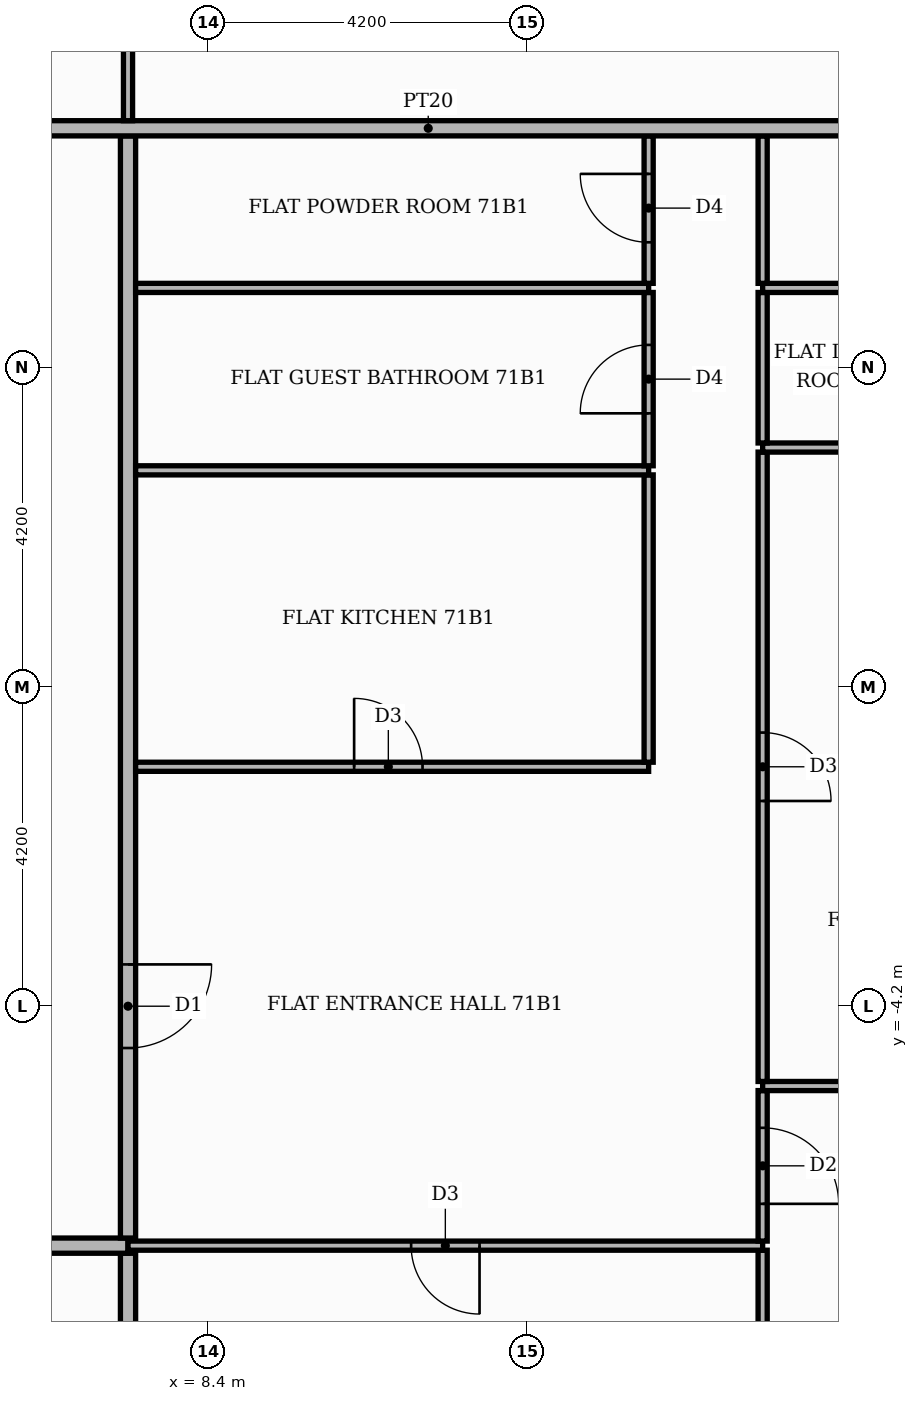
"""IFC4 building model, lengths in metres.
Left out: names, types, materials, properties, quantities, classifications, styles, units other than length and angle.
Written with IfcOpenShell. Run it as: python <this file> out.ifc"""

import sys

from ifc_helpers import new_model, si_unit, direction, frame, frame_2d, origin, place, context, subcontext, project, spatial, rectangle, extrude, element, fill, save


model = new_model("IFC4")
c1 = context("Model", 3, precision=1e-05, world=origin(), true_north=direction((0.0, 1.0)))
c2 = subcontext(c1, "Body", "Model", "MODEL_VIEW")
j1 = project(units=[si_unit("LENGTHUNIT", "METRE"), si_unit("PLANEANGLEUNIT", "RADIAN")], contexts=[c1])
p1 = place(None, origin())
s1 = spatial("IfcSite", under=j1, at=p1, CompositionType="ELEMENT")
p2 = place(p1, origin())
s2 = spatial("IfcBuilding", under=s1, at=p2, CompositionType="ELEMENT")
p3 = place(p2, frame((0.0, 0.0, 296.7)))
s3 = spatial("IfcBuildingStorey", under=s2, at=p3, CompositionType="ELEMENT", Elevation=296.7)
p4 = place(p3, frame((7.35, -21.3, 0.0), z_axis=(0.0, 0.0, 1.0), x_axis=(0.0, 1.0, 0.0)))
e1 = element("IfcWall", 1, at=p4, inside=s3, PredefinedType="PARTITIONING", context=c2, shape_type="SweptSolid", body=[
    extrude(rectangle(XDim=13.85, YDim=0.2, at=frame_2d((6.925, 0.0))), origin(), (0.0, 0.0, 1.0), 3.55),
])
p5 = place(p3, frame((15.7, -14.9, 0.0), z_axis=(0.0, 0.0, 1.0), x_axis=(0.0, 1.0, 0.0)))
e2 = element("IfcWall", 2, at=p5, inside=s3, PredefinedType="PARTITIONING", context=c2, shape_type="SweptSolid", body=[
    extrude(rectangle(XDim=7.49, YDim=0.12, at=frame_2d((3.745, 0.0))), origin(), (0.0, 0.0, 1.0), 3.55),
])
p6 = place(p3, frame((-21.3, -7.35, 0.0), z_axis=(0.0, 0.0, 1.0), x_axis=(1.0, 0.0, 0.0)))
e3 = element("IfcWall", 3, at=p6, inside=s3, PredefinedType="PARTITIONING", context=c2, shape_type="SweptSolid", body=[
    extrude(rectangle(XDim=28.65, YDim=0.2, at=frame_2d((14.325, 0.0))), origin(), (0.0, 0.0, 1.0), 3.55),
])
p7 = place(p6, frame((16.55, 0.0, 0.0)))
e4 = element("IfcOpeningElement", 4, at=p7, cuts=e3, PredefinedType="OPENING", context=c2, shape_type="SweptSolid", body=[
    extrude(rectangle(XDim=1.1, YDim=2.4, at=frame_2d((0.55, 1.2))), frame((0.0, 0.11, 0.0), z_axis=(0.0, -1.0, 0.0), x_axis=(1.0, 0.0, 0.0)), (0.0, 0.0, 1.0), 0.22),
])
p8 = place(p3, frame((7.35, -7.35, 0.0), z_axis=(0.0, 0.0, 1.0), x_axis=(1.0, 0.0, 0.0)))
e5 = element("IfcWall", 5, at=p8, inside=s3, PredefinedType="PARTITIONING", context=c2, shape_type="SweptSolid", body=[
    extrude(rectangle(XDim=8.35, YDim=0.12, at=frame_2d((4.175, 0.0))), origin(), (0.0, 0.0, 1.0), 3.55),
])
p9 = place(p8, frame((3.725, 0.0, 0.0)))
e6 = element("IfcOpeningElement", 6, at=p9, cuts=e5, PredefinedType="OPENING", context=c2, shape_type="SweptSolid", body=[
    extrude(rectangle(XDim=0.9, YDim=2.1, at=frame_2d((0.45, 1.05))), frame((0.0, 0.07, 0.0), z_axis=(0.0, -1.0, 0.0), x_axis=(1.0, 0.0, 0.0)), (0.0, 0.0, 1.0), 0.14),
])
p10 = place(p3, frame((15.7, -7.29, 0.0), z_axis=(0.0, 0.0, 1.0), x_axis=(0.0, 1.0, 0.0)))
e7 = element("IfcWall", 7, at=p10, inside=s3, PredefinedType="PARTITIONING", context=c2, shape_type="SweptSolid", body=[
    extrude(rectangle(XDim=1.98, YDim=0.12, at=frame_2d((0.99, 0.0))), origin(), (0.0, 0.0, 1.0), 3.55),
])
p11 = place(p10, frame((0.49, 0.0, 0.0)))
e8 = element("IfcOpeningElement", 8, at=p11, cuts=e7, PredefinedType="OPENING", context=c2, shape_type="SweptSolid", body=[
    extrude(rectangle(XDim=1.0, YDim=2.1, at=frame_2d((0.5, 1.05))), frame((0.0, 0.07, 0.0), z_axis=(0.0, -1.0, 0.0), x_axis=(1.0, 0.0, 0.0)), (0.0, 0.0, 1.0), 0.14),
])
p12 = place(p3, frame((7.35, -7.25, 0.0), z_axis=(0.0, 0.0, 1.0), x_axis=(0.0, 1.0, 0.0)))
e9 = element("IfcWall", 9, at=p12, inside=s3, PredefinedType="PARTITIONING", context=c2, shape_type="SweptSolid", body=[
    extrude(rectangle(XDim=14.5, YDim=0.2, at=frame_2d((7.25, 0.0))), origin(), (0.0, 0.0, 1.0), 3.55),
])
p13 = place(p12, frame((2.5, 0.0, 0.0)))
e10 = element("IfcOpeningElement", 10, at=p13, cuts=e9, PredefinedType="OPENING", context=c2, shape_type="SweptSolid", body=[
    extrude(rectangle(XDim=1.1, YDim=2.4, at=frame_2d((0.55, 1.2))), frame((0.0, 0.11, 0.0), z_axis=(0.0, -1.0, 0.0), x_axis=(1.0, 0.0, 0.0)), (0.0, 0.0, 1.0), 0.22),
])
p14 = place(p3, frame((15.7, -5.25, 0.0), z_axis=(0.0, 0.0, 1.0), x_axis=(1.0, 0.0, 0.0)))
e11 = element("IfcWall", 11, at=p14, inside=s3, PredefinedType="PARTITIONING", context=c2, shape_type="SweptSolid", body=[
    extrude(rectangle(XDim=5.6, YDim=0.12, at=frame_2d((2.8, 0.0))), origin(), (0.0, 0.0, 1.0), 3.55),
])
p15 = place(p3, frame((15.7, -5.19, 0.0), z_axis=(0.0, 0.0, 1.0), x_axis=(0.0, 1.0, 0.0)))
e12 = element("IfcWall", 12, at=p15, inside=s3, PredefinedType="PARTITIONING", context=c2, shape_type="SweptSolid", body=[
    extrude(rectangle(XDim=8.28, YDim=0.12, at=frame_2d((4.14, 0.0))), origin(), (0.0, 0.0, 1.0), 3.55),
])
p16 = place(p15, frame((3.69, 0.0, 0.0)))
e13 = element("IfcOpeningElement", 13, at=p16, cuts=e12, PredefinedType="OPENING", context=c2, shape_type="SweptSolid", body=[
    extrude(rectangle(XDim=0.9, YDim=2.1, at=frame_2d((0.45, 1.05))), frame((0.0, 0.07, 0.0), z_axis=(0.0, -1.0, 0.0), x_axis=(1.0, 0.0, 0.0)), (0.0, 0.0, 1.0), 0.14),
])
p17 = place(p3, frame((7.45, -1.05, 0.0), z_axis=(0.0, 0.0, 1.0), x_axis=(1.0, 0.0, 0.0)))
e14 = element("IfcWall", 14, at=p17, inside=s3, PredefinedType="PARTITIONING", context=c2, shape_type="SweptSolid", body=[
    extrude(rectangle(XDim=6.75, YDim=0.12, at=frame_2d((3.375, 0.0))), origin(), (0.0, 0.0, 1.0), 3.55),
])
p18 = place(p17, frame((2.875, 0.0, 0.0)))
e15 = element("IfcOpeningElement", 15, at=p18, cuts=e14, PredefinedType="OPENING", context=c2, shape_type="SweptSolid", body=[
    extrude(rectangle(XDim=0.9, YDim=2.1, at=frame_2d((0.45, 1.05))), frame((0.0, 0.07, 0.0), z_axis=(0.0, -1.0, 0.0), x_axis=(1.0, 0.0, 0.0)), (0.0, 0.0, 1.0), 0.14),
])
p19 = place(p3, frame((14.2, -0.99, 0.0), z_axis=(0.0, 0.0, 1.0), x_axis=(0.0, 1.0, 0.0)))
e16 = element("IfcWall", 16, at=p19, inside=s3, PredefinedType="PARTITIONING", context=c2, shape_type="SweptSolid", body=[
    extrude(rectangle(XDim=3.78, YDim=0.12, at=frame_2d((1.89, 0.0))), origin(), (0.0, 0.0, 1.0), 3.55),
])
p20 = place(p3, frame((7.45, 2.85, 0.0), z_axis=(0.0, 0.0, 1.0), x_axis=(1.0, 0.0, 0.0)))
e17 = element("IfcWall", 17, at=p20, inside=s3, PredefinedType="PARTITIONING", context=c2, shape_type="SweptSolid", body=[
    extrude(rectangle(XDim=6.75, YDim=0.12, at=frame_2d((3.375, 0.0))), origin(), (0.0, 0.0, 1.0), 3.55),
])
p21 = place(p3, frame((14.2, 2.91, 0.0), z_axis=(0.0, 0.0, 1.0), x_axis=(0.0, 1.0, 0.0)))
e18 = element("IfcWall", 18, at=p21, inside=s3, PredefinedType="PARTITIONING", context=c2, shape_type="SweptSolid", body=[
    extrude(rectangle(XDim=2.28, YDim=0.12, at=frame_2d((1.14, 0.0))), origin(), (0.0, 0.0, 1.0), 3.55),
])
p22 = place(p21, frame((0.69, 0.0, 0.0)))
e19 = element("IfcOpeningElement", 19, at=p22, cuts=e18, PredefinedType="OPENING", context=c2, shape_type="SweptSolid", body=[
    extrude(rectangle(XDim=0.9, YDim=2.1, at=frame_2d((0.45, 1.05))), frame((0.0, 0.07, 0.0), z_axis=(0.0, -1.0, 0.0), x_axis=(1.0, 0.0, 0.0)), (0.0, 0.0, 1.0), 0.14),
])
p23 = place(p3, frame((15.7, 3.15, 0.0), z_axis=(0.0, 0.0, 1.0), x_axis=(1.0, 0.0, 0.0)))
e20 = element("IfcWall", 20, at=p23, inside=s3, PredefinedType="PARTITIONING", context=c2, shape_type="SweptSolid", body=[
    extrude(rectangle(XDim=5.6, YDim=0.12, at=frame_2d((2.8, 0.0))), origin(), (0.0, 0.0, 1.0), 3.55),
])
p24 = place(p23, frame((2.5, 0.0, 0.0)))
e21 = element("IfcOpeningElement", 21, at=p24, cuts=e20, PredefinedType="OPENING", context=c2, shape_type="SweptSolid", body=[
    extrude(rectangle(XDim=0.9, YDim=2.1, at=frame_2d((0.45, 1.05))), frame((0.0, 0.07, 0.0), z_axis=(0.0, -1.0, 0.0), x_axis=(1.0, 0.0, 0.0)), (0.0, 0.0, 1.0), 0.14),
])
p25 = place(p3, frame((15.7, 3.21, 0.0), z_axis=(0.0, 0.0, 1.0), x_axis=(0.0, 1.0, 0.0)))
e22 = element("IfcWall", 22, at=p25, inside=s3, PredefinedType="PARTITIONING", context=c2, shape_type="SweptSolid", body=[
    extrude(rectangle(XDim=1.98, YDim=0.12, at=frame_2d((0.99, 0.0))), origin(), (0.0, 0.0, 1.0), 3.55),
])
p26 = place(p3, frame((7.45, 5.25, 0.0), z_axis=(0.0, 0.0, 1.0), x_axis=(1.0, 0.0, 0.0)))
e23 = element("IfcWall", 23, at=p26, inside=s3, PredefinedType="PARTITIONING", context=c2, shape_type="SweptSolid", body=[
    extrude(rectangle(XDim=6.75, YDim=0.12, at=frame_2d((3.375, 0.0))), origin(), (0.0, 0.0, 1.0), 3.55),
])
p27 = place(p3, frame((15.7, 5.25, 0.0), z_axis=(0.0, 0.0, 1.0), x_axis=(1.0, 0.0, 0.0)))
e24 = element("IfcWall", 24, at=p27, inside=s3, PredefinedType="PARTITIONING", context=c2, shape_type="SweptSolid", body=[
    extrude(rectangle(XDim=5.6, YDim=0.12, at=frame_2d((2.8, 0.0))), origin(), (0.0, 0.0, 1.0), 3.55),
])
p28 = place(p27, frame((2.5, 0.0, 0.0)))
e25 = element("IfcOpeningElement", 25, at=p28, cuts=e24, PredefinedType="OPENING", context=c2, shape_type="SweptSolid", body=[
    extrude(rectangle(XDim=0.9, YDim=2.1, at=frame_2d((0.45, 1.05))), frame((0.0, 0.07, 0.0), z_axis=(0.0, -1.0, 0.0), x_axis=(1.0, 0.0, 0.0)), (0.0, 0.0, 1.0), 0.14),
])
p29 = place(p3, frame((14.2, 5.31, 0.0), z_axis=(0.0, 0.0, 1.0), x_axis=(0.0, 1.0, 0.0)))
e26 = element("IfcWall", 26, at=p29, inside=s3, PredefinedType="PARTITIONING", context=c2, shape_type="SweptSolid", body=[
    extrude(rectangle(XDim=1.94, YDim=0.12, at=frame_2d((0.97, 0.0))), origin(), (0.0, 0.0, 1.0), 3.55),
])
p30 = place(p29, frame((0.54, 0.0, 0.0)))
e27 = element("IfcOpeningElement", 27, at=p30, cuts=e26, PredefinedType="OPENING", context=c2, shape_type="SweptSolid", body=[
    extrude(rectangle(XDim=0.9, YDim=2.1, at=frame_2d((0.45, 1.05))), frame((0.0, 0.07, 0.0), z_axis=(0.0, -1.0, 0.0), x_axis=(1.0, 0.0, 0.0)), (0.0, 0.0, 1.0), 0.14),
])
p31 = place(p3, frame((15.7, 5.31, 0.0), z_axis=(0.0, 0.0, 1.0), x_axis=(0.0, 1.0, 0.0)))
e28 = element("IfcWall", 28, at=p31, inside=s3, PredefinedType="PARTITIONING", context=c2, shape_type="SweptSolid", body=[
    extrude(rectangle(XDim=1.94, YDim=0.12, at=frame_2d((0.97, 0.0))), origin(), (0.0, 0.0, 1.0), 3.55),
])
p32 = place(p3, frame((1.3, 7.35, 0.0), z_axis=(0.0, 0.0, 1.0), x_axis=(1.0, 0.0, 0.0)))
e29 = element("IfcWall", 29, at=p32, inside=s3, PredefinedType="PARTITIONING", context=c2, shape_type="SweptSolid", body=[
    extrude(rectangle(XDim=20.0, YDim=0.2, at=frame_2d((10.0, 0.0))), origin(), (0.0, 0.0, 1.0), 3.55),
])
p33 = place(p32, frame((2.475, 0.0, 0.0)))
e30 = element("IfcOpeningElement", 30, at=p33, cuts=e29, PredefinedType="OPENING", context=c2, shape_type="SweptSolid", body=[
    extrude(rectangle(XDim=1.1, YDim=2.4, at=frame_2d((0.55, 1.2))), frame((0.0, 0.11, 0.0), z_axis=(0.0, -1.0, 0.0), x_axis=(1.0, 0.0, 0.0)), (0.0, 0.0, 1.0), 0.22),
])
p34 = place(p3, frame((7.35, 7.45, 0.0), z_axis=(0.0, 0.0, 1.0), x_axis=(0.0, 1.0, 0.0)))
e31 = element("IfcWall", 31, at=p34, inside=s3, PredefinedType="PARTITIONING", context=c2, shape_type="SweptSolid", body=[
    extrude(rectangle(XDim=8.49, YDim=0.12, at=frame_2d((4.245, 0.0))), origin(), (0.0, 0.0, 1.0), 3.55),
])
p35 = place(p34, frame((3.775, 0.0, 0.0)))
e32 = element("IfcOpeningElement", 32, at=p35, cuts=e31, PredefinedType="OPENING", context=c2, shape_type="SweptSolid", body=[
    extrude(rectangle(XDim=0.9, YDim=2.1, at=frame_2d((0.45, 1.05))), frame((0.0, 0.07, 0.0), z_axis=(0.0, -1.0, 0.0), x_axis=(1.0, 0.0, 0.0)), (0.0, 0.0, 1.0), 0.14),
])
p36 = place(p13, frame((1.1, 0.0, 0.0), z_axis=(0.0, 0.0, 1.0), x_axis=(-1.0, 0.0, 0.0)))
e33 = element("IfcDoor", 33, at=p36, inside=s3, OperationType="SINGLE_SWING_RIGHT", PredefinedType="DOOR", context=c2, shape_type="SweptSolid", body=[
    extrude(rectangle(XDim=1.1, YDim=2.4, at=frame_2d((0.55, 1.2))), frame((0.0, 0.025, 0.0), z_axis=(0.0, -1.0, 0.0), x_axis=(1.0, 0.0, 0.0)), (0.0, 0.0, 1.0), 0.05),
])
fill(e10, e33)
p37 = place(p9, frame((0.9, 0.0, 0.0), z_axis=(0.0, 0.0, 1.0), x_axis=(-1.0, 0.0, 0.0)))
e34 = element("IfcDoor", 34, at=p37, inside=s3, OperationType="SINGLE_SWING_RIGHT", PredefinedType="DOOR", context=c2, shape_type="SweptSolid", body=[
    extrude(rectangle(XDim=0.9, YDim=2.1, at=frame_2d((0.45, 1.05))), frame((0.0, 0.025, 0.0), z_axis=(0.0, -1.0, 0.0), x_axis=(1.0, 0.0, 0.0)), (0.0, 0.0, 1.0), 0.05),
])
fill(e6, e34)
p38 = place(p18, origin())
e35 = element("IfcDoor", 35, at=p38, inside=s3, OperationType="SINGLE_SWING_LEFT", PredefinedType="DOOR", context=c2, shape_type="SweptSolid", body=[
    extrude(rectangle(XDim=0.9, YDim=2.1, at=frame_2d((0.45, 1.05))), frame((0.0, 0.025, 0.0), z_axis=(0.0, -1.0, 0.0), x_axis=(1.0, 0.0, 0.0)), (0.0, 0.0, 1.0), 0.05),
])
fill(e15, e35)
p39 = place(p22, origin())
e36 = element("IfcDoor", 36, at=p39, inside=s3, OperationType="SINGLE_SWING_LEFT", PredefinedType="DOOR", context=c2, shape_type="SweptSolid", body=[
    extrude(rectangle(XDim=0.9, YDim=2.1, at=frame_2d((0.45, 1.05))), frame((0.0, 0.025, 0.0), z_axis=(0.0, -1.0, 0.0), x_axis=(1.0, 0.0, 0.0)), (0.0, 0.0, 1.0), 0.05),
])
fill(e19, e36)
p40 = place(p30, origin())
e37 = element("IfcDoor", 37, at=p40, inside=s3, OperationType="SINGLE_SWING_RIGHT", PredefinedType="DOOR", context=c2, shape_type="SweptSolid", body=[
    extrude(rectangle(XDim=0.9, YDim=2.1, at=frame_2d((0.45, 1.05))), frame((0.0, 0.025, 0.0), z_axis=(0.0, -1.0, 0.0), x_axis=(1.0, 0.0, 0.0)), (0.0, 0.0, 1.0), 0.05),
])
fill(e27, e37)
p41 = place(p11, frame((1.0, 0.0, 0.0), z_axis=(0.0, 0.0, 1.0), x_axis=(-1.0, 0.0, 0.0)))
e38 = element("IfcDoor", 38, at=p41, inside=s3, OperationType="SINGLE_SWING_LEFT", PredefinedType="DOOR", context=c2, shape_type="SweptSolid", body=[
    extrude(rectangle(XDim=1.0, YDim=2.1, at=frame_2d((0.5, 1.05))), frame((0.0, 0.025, 0.0), z_axis=(0.0, -1.0, 0.0), x_axis=(1.0, 0.0, 0.0)), (0.0, 0.0, 1.0), 0.05),
])
fill(e8, e38)
p42 = place(p16, frame((0.9, 0.0, 0.0), z_axis=(0.0, 0.0, 1.0), x_axis=(-1.0, 0.0, 0.0)))
e39 = element("IfcDoor", 39, at=p42, inside=s3, OperationType="SINGLE_SWING_LEFT", PredefinedType="DOOR", context=c2, shape_type="SweptSolid", body=[
    extrude(rectangle(XDim=0.9, YDim=2.1, at=frame_2d((0.45, 1.05))), frame((0.0, 0.025, 0.0), z_axis=(0.0, -1.0, 0.0), x_axis=(1.0, 0.0, 0.0)), (0.0, 0.0, 1.0), 0.05),
])
fill(e13, e39)
save(model, sys.argv[1])
